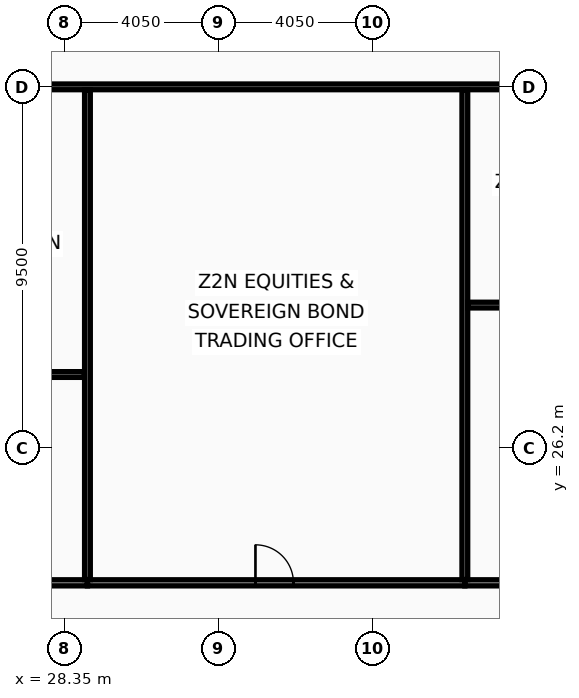
"""IFC4 building model, lengths in metres.
Left out: names, types, materials, properties, quantities, classifications, styles, units other than length and angle.
Written with IfcOpenShell. Run it as: python <this file> out.ifc"""

import sys

from ifc_helpers import new_model, si_unit, direction, frame, frame_2d, origin, place, context, subcontext, project, spatial, rectangle, extrude, element, fill, save


model = new_model("IFC4")
c1 = context("Model", 3, precision=1e-05, world=origin(), true_north=direction((0.0, 1.0)))
c2 = subcontext(c1, "Body", "Model", "MODEL_VIEW")
j1 = project(units=[si_unit("LENGTHUNIT", "METRE"), si_unit("PLANEANGLEUNIT", "RADIAN")], contexts=[c1])
p1 = place(None, origin())
s1 = spatial("IfcSite", under=j1, at=p1, CompositionType="ELEMENT")
p2 = place(p1, origin())
s2 = spatial("IfcBuilding", under=s1, at=p2, CompositionType="ELEMENT")
p3 = place(p2, frame((0.0, 0.0, 154.2)))
s3 = spatial("IfcBuildingStorey", under=s2, at=p3, CompositionType="ELEMENT", Elevation=154.2)
p4 = place(p3, frame((21.81, 35.7, 0.0), z_axis=(0.0, 0.0, 1.0), x_axis=(1.0, 0.0, 0.0)))
e1 = element("IfcWall", 1, at=p4, inside=s3, PredefinedType="PARTITIONING", context=c2, shape_type="SweptSolid", body=[
    extrude(rectangle(XDim=44.995, YDim=0.15, at=frame_2d((22.498, 0.0))), origin(), (0.0, 0.0, 1.0), 2.73),
])
p5 = place(p3, frame((21.73, 22.65, 0.0), z_axis=(0.0, 0.0, 1.0), x_axis=(1.0, 0.0, 0.0)))
e2 = element("IfcWall", 2, at=p5, inside=s3, PredefinedType="PARTITIONING", context=c2, shape_type="SweptSolid", body=[
    extrude(rectangle(XDim=7.222, YDim=0.16, at=frame_2d((3.611, 0.0))), origin(), (0.0, 0.0, 1.0), 2.73),
])
p6 = place(p5, frame((3.283, 0.0, 0.0)))
e3 = element("IfcOpeningElement", 3, at=p6, cuts=e2, PredefinedType="OPENING", context=c2, shape_type="SweptSolid", body=[
    extrude(rectangle(XDim=1.0, YDim=2.05, at=frame_2d((0.5, 1.025))), frame((0.0, 0.09, 0.0), z_axis=(0.0, -1.0, 0.0), x_axis=(1.0, 0.0, 0.0)), (0.0, 0.0, 1.0), 0.18),
])
p7 = place(p3, frame((21.81, 28.131, 0.0), z_axis=(0.0, 0.0, 1.0), x_axis=(1.0, 0.0, 0.0)))
e4 = element("IfcWall", 4, at=p7, inside=s3, PredefinedType="PARTITIONING", context=c2, shape_type="SweptSolid", body=[
    extrude(rectangle(XDim=7.062, YDim=0.15, at=frame_2d((3.531, 0.0))), origin(), (0.0, 0.0, 1.0), 2.73),
])
p8 = place(p7, frame((3.25, 0.0, 0.0)))
e5 = element("IfcOpeningElement", 5, at=p8, cuts=e4, PredefinedType="OPENING", context=c2, shape_type="SweptSolid", body=[
    extrude(rectangle(XDim=0.9, YDim=2.05, at=frame_2d((0.45, 1.025))), frame((0.0, 0.085, 0.0), z_axis=(0.0, -1.0, 0.0), x_axis=(1.0, 0.0, 0.0)), (0.0, 0.0, 1.0), 0.17),
])
p9 = place(p3, frame((28.952, 22.65, 0.0), z_axis=(0.0, 0.0, 1.0), x_axis=(1.0, 0.0, 0.0)))
e6 = element("IfcWall", 6, at=p9, inside=s3, PredefinedType="PARTITIONING", context=c2, shape_type="SweptSolid", body=[
    extrude(rectangle(XDim=9.931, YDim=0.16, at=frame_2d((4.965, 0.0))), origin(), (0.0, 0.0, 1.0), 2.73),
])
p10 = place(p9, frame((4.421, 0.0, 0.0)))
e7 = element("IfcOpeningElement", 7, at=p10, cuts=e6, PredefinedType="OPENING", context=c2, shape_type="SweptSolid", body=[
    extrude(rectangle(XDim=1.0, YDim=2.05, at=frame_2d((0.5, 1.025))), frame((0.0, 0.09, 0.0), z_axis=(0.0, -1.0, 0.0), x_axis=(1.0, 0.0, 0.0)), (0.0, 0.0, 1.0), 0.18),
])
p11 = place(p3, frame((28.952, 22.735, 0.0), z_axis=(0.0, 0.0, 1.0), x_axis=(0.0, 1.0, 0.0)))
e8 = element("IfcWall", 8, at=p11, inside=s3, PredefinedType="PARTITIONING", context=c2, shape_type="SweptSolid", body=[
    extrude(rectangle(XDim=12.885, YDim=0.15, at=frame_2d((6.442, 0.0))), origin(), (0.0, 0.0, 1.0), 2.93),
])
p12 = place(p3, frame((38.883, 22.65, 0.0), z_axis=(0.0, 0.0, 1.0), x_axis=(1.0, 0.0, 0.0)))
e9 = element("IfcWall", 9, at=p12, inside=s3, PredefinedType="PARTITIONING", context=c2, shape_type="SweptSolid", body=[
    extrude(rectangle(XDim=12.639, YDim=0.16, at=frame_2d((6.32, 0.0))), origin(), (0.0, 0.0, 1.0), 2.73),
])
p13 = place(p12, frame((5.559, 0.0, 0.0)))
e10 = element("IfcOpeningElement", 10, at=p13, cuts=e9, PredefinedType="OPENING", context=c2, shape_type="SweptSolid", body=[
    extrude(rectangle(XDim=1.0, YDim=2.05, at=frame_2d((0.5, 1.025))), frame((0.0, 0.09, 0.0), z_axis=(0.0, -1.0, 0.0), x_axis=(1.0, 0.0, 0.0)), (0.0, 0.0, 1.0), 0.18),
])
p14 = place(p3, frame((38.883, 22.735, 0.0), z_axis=(0.0, 0.0, 1.0), x_axis=(0.0, 1.0, 0.0)))
e11 = element("IfcWall", 11, at=p14, inside=s3, PredefinedType="PARTITIONING", context=c2, shape_type="SweptSolid", body=[
    extrude(rectangle(XDim=12.885, YDim=0.15, at=frame_2d((6.442, 0.0))), origin(), (0.0, 0.0, 1.0), 2.93),
])
p15 = place(p3, frame((38.963, 29.958, 0.0), z_axis=(0.0, 0.0, 1.0), x_axis=(1.0, 0.0, 0.0)))
e12 = element("IfcWall", 12, at=p15, inside=s3, PredefinedType="PARTITIONING", context=c2, shape_type="SweptSolid", body=[
    extrude(rectangle(XDim=12.479, YDim=0.15, at=frame_2d((6.24, 0.0))), origin(), (0.0, 0.0, 1.0), 2.73),
])
p16 = place(p15, frame((5.688, 0.0, 0.0)))
e13 = element("IfcOpeningElement", 13, at=p16, cuts=e12, PredefinedType="OPENING", context=c2, shape_type="SweptSolid", body=[
    extrude(rectangle(XDim=0.9, YDim=2.05, at=frame_2d((0.45, 1.025))), frame((0.0, 0.085, 0.0), z_axis=(0.0, -1.0, 0.0), x_axis=(1.0, 0.0, 0.0)), (0.0, 0.0, 1.0), 0.17),
])
p17 = place(p10, origin())
e14 = element("IfcDoor", 14, at=p17, inside=s3, OperationType="SINGLE_SWING_LEFT", PredefinedType="DOOR", context=c2, shape_type="SweptSolid", body=[
    extrude(rectangle(XDim=1.0, YDim=2.05, at=frame_2d((0.5, 1.025))), frame((0.0, 0.025, 0.0), z_axis=(0.0, -1.0, 0.0), x_axis=(1.0, 0.0, 0.0)), (0.0, 0.0, 1.0), 0.05),
])
fill(e7, e14)
save(model, sys.argv[1])
